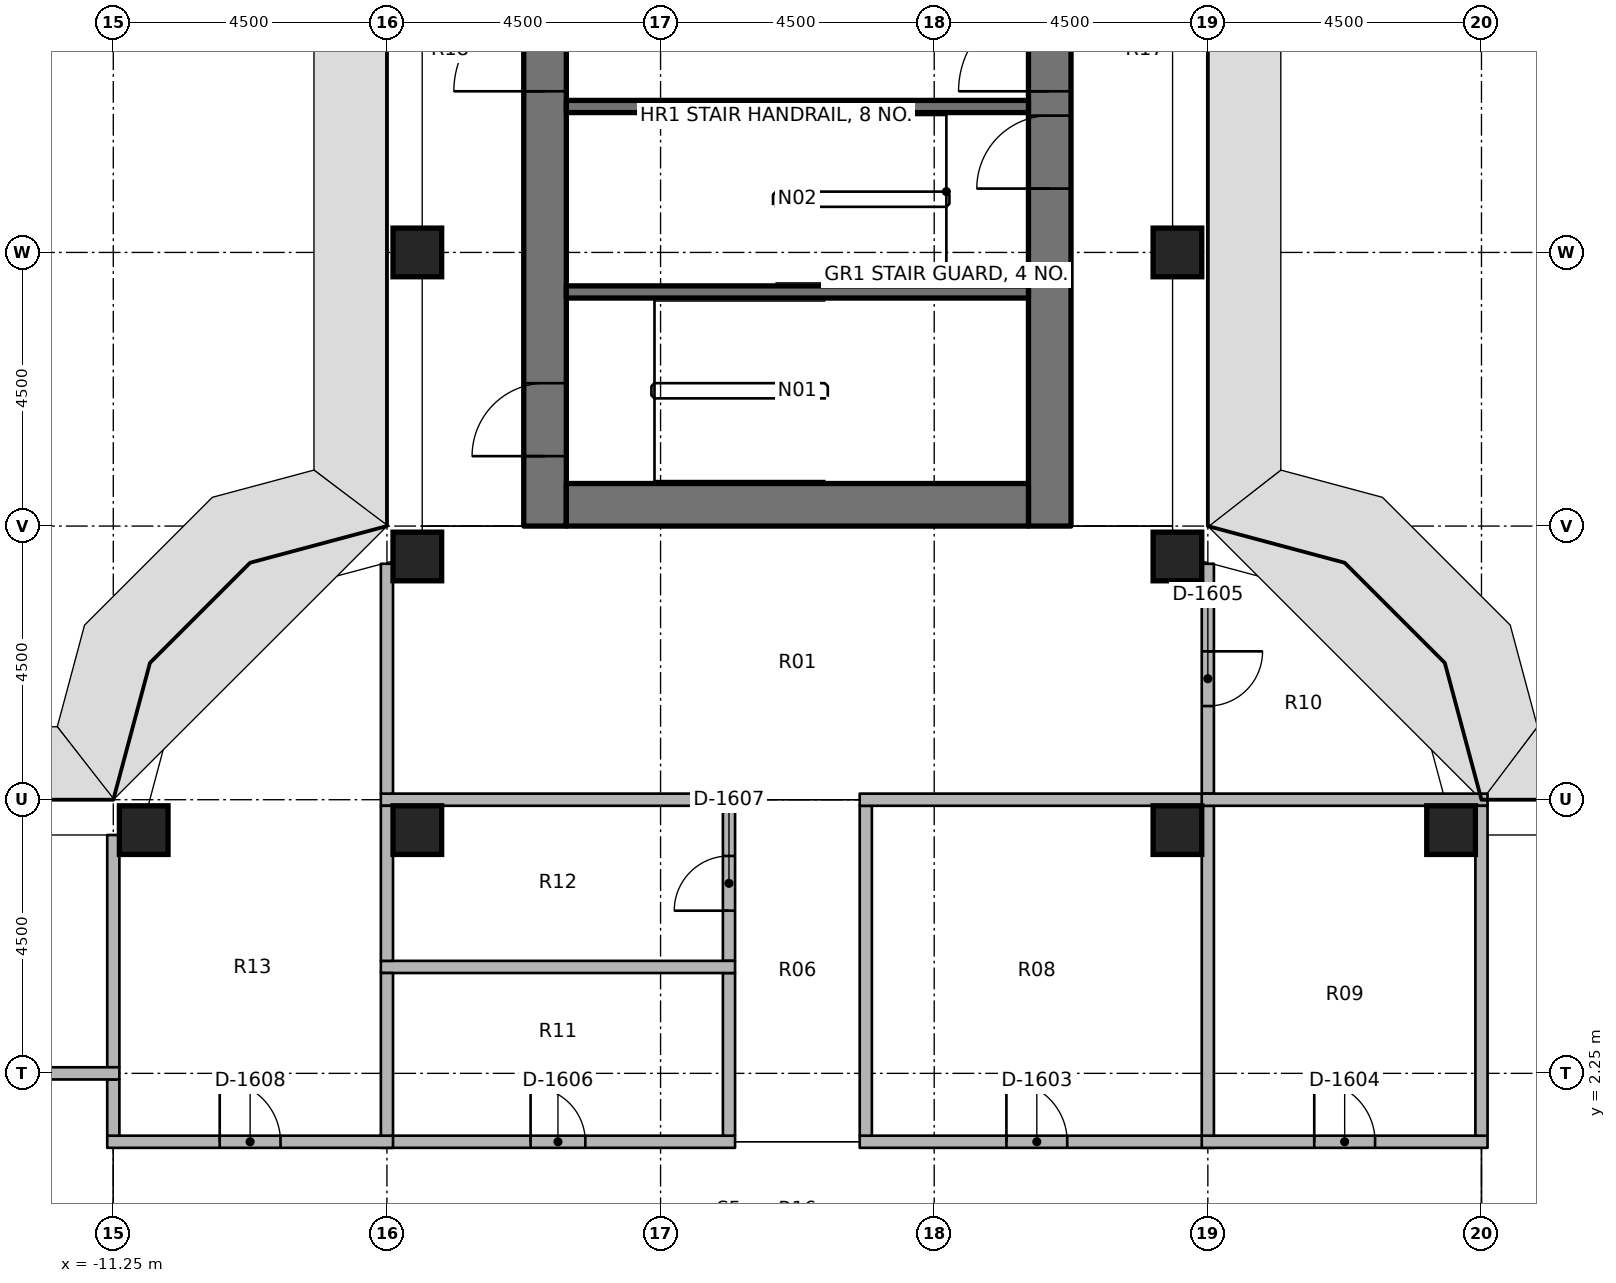
"""IFC4 building model, lengths in metres.
Left out: names, types, materials, properties, quantities, classifications, styles, units other than length and angle.
Written with IfcOpenShell. Run it as: python <this file> out.ifc"""

import sys

from ifc_helpers import new_model, si_unit, direction, frame, frame_2d, origin, origin_2d, place, context, subcontext, project, spatial, rectangle, extrude, element, fill, save


model = new_model("IFC4")
c1 = context("Model", 3, precision=1e-05, world=origin(), true_north=direction((0.0, 1.0)))
c2 = subcontext(c1, "Body", "Model", "MODEL_VIEW")
j1 = project(units=[si_unit("LENGTHUNIT", "METRE"), si_unit("PLANEANGLEUNIT", "RADIAN")], contexts=[c1])
p1 = place(None, origin())
s1 = spatial("IfcSite", under=j1, at=p1, CompositionType="ELEMENT")
p2 = place(p1, origin())
s2 = spatial("IfcBuilding", under=s1, at=p2, CompositionType="ELEMENT")
p3 = place(p2, frame((0.0, 0.0, 156.2)))
s3 = spatial("IfcBuildingStorey", under=s2, at=p3, CompositionType="ELEMENT", Elevation=156.2)
for number, where, z_axis, x_axis in (
    (1, (-10.75, 6.25, 0.0), (0.0, 0.0, 1.0), (1.0, 0.0, 0.0)),
    (2, (-6.25, 6.25, 0.0), (0.0, 0.0, 1.0), (1.0, 0.0, 0.0)),
    (3, (-6.25, 10.75, 0.0), (0.0, 0.0, 1.0), (1.0, 0.0, 0.0)),
    (4, (-6.25, 15.75, 0.0), (0.0, 0.0, 1.0), (1.0, 0.0, 0.0)),
    (5, (6.25, 6.25, 0.0), (0.0, 0.0, 1.0), (1.0, 0.0, 0.0)),
    (6, (6.25, 10.75, 0.0), (0.0, 0.0, 1.0), (1.0, 0.0, 0.0)),
    (7, (6.25, 15.75, 0.0), (0.0, 0.0, 1.0), (1.0, 0.0, 0.0)),
    (8, (10.75, 6.25, 0.0), (0.0, 0.0, 1.0), (1.0, 0.0, 0.0)),
):
    element("IfcColumn", number, at=place(p3, frame(where, z_axis=z_axis, x_axis=x_axis)), inside=s3, PredefinedType="COLUMN", context=c2, shape_type="SweptSolid", body=[
        extrude(rectangle(XDim=0.8, YDim=0.8, at=origin_2d()), origin(), (0.0, 0.0, 1.0), 3.65),
    ])
p4 = place(p3, frame((-4.15, 11.25, 0.0), z_axis=(0.0, 0.0, 1.0), x_axis=(0.0, 1.0, 0.0)))
e9 = element("IfcWall", 9, at=p4, inside=s3, PredefinedType="SHEAR", context=c2, shape_type="SweptSolid", body=[
    extrude(rectangle(XDim=15.0, YDim=0.7, at=frame_2d((7.5, 0.0))), origin(), (0.0, 0.0, 1.0), 3.8),
])
p5 = place(p4, frame((7.15, 0.0, 0.0)))
e10 = element("IfcOpeningElement", 10, at=p5, cuts=e9, PredefinedType="OPENING", context=c2, shape_type="SweptSolid", body=[
    extrude(rectangle(XDim=1.5, YDim=2.3, at=frame_2d((0.75, 1.15))), frame((0.0, 0.36, 0.0), z_axis=(0.0, -1.0, 0.0), x_axis=(1.0, 0.0, 0.0)), (0.0, 0.0, 1.0), 0.72),
])
p6 = place(p4, frame((13.9, 0.0, 0.0)))
e11 = element("IfcOpeningElement", 11, at=p6, cuts=e9, PredefinedType="OPENING", context=c2, shape_type="SweptSolid", body=[
    extrude(rectangle(XDim=0.9, YDim=2.1, at=frame_2d((0.45, 1.05))), frame((0.0, 0.36, 0.0), z_axis=(0.0, -1.0, 0.0), x_axis=(1.0, 0.0, 0.0)), (0.0, 0.0, 1.0), 0.72),
])
p7 = place(p4, frame((1.15, 0.0, 0.0)))
e12 = element("IfcOpeningElement", 12, at=p7, cuts=e9, PredefinedType="OPENING", context=c2, shape_type="SweptSolid", body=[
    extrude(rectangle(XDim=1.2, YDim=2.1, at=frame_2d((0.6, 1.05))), frame((0.0, 0.36, 0.0), z_axis=(0.0, -1.0, 0.0), x_axis=(1.0, 0.0, 0.0)), (0.0, 0.0, 1.0), 0.72),
])
p8 = place(p3, frame((4.15, 11.25, 0.0), z_axis=(0.0, 0.0, 1.0), x_axis=(0.0, 1.0, 0.0)))
e13 = element("IfcWall", 13, at=p8, inside=s3, PredefinedType="SHEAR", context=c2, shape_type="SweptSolid", body=[
    extrude(rectangle(XDim=15.0, YDim=0.7, at=frame_2d((7.5, 0.0))), origin(), (0.0, 0.0, 1.0), 3.8),
])
p9 = place(p8, frame((7.15, 0.0, 0.0)))
e14 = element("IfcOpeningElement", 14, at=p9, cuts=e13, PredefinedType="OPENING", context=c2, shape_type="SweptSolid", body=[
    extrude(rectangle(XDim=1.5, YDim=2.3, at=frame_2d((0.75, 1.15))), frame((0.0, 0.36, 0.0), z_axis=(0.0, -1.0, 0.0), x_axis=(1.0, 0.0, 0.0)), (0.0, 0.0, 1.0), 0.72),
])
p10 = place(p8, frame((5.55, 0.0, 0.0)))
e15 = element("IfcOpeningElement", 15, at=p10, cuts=e13, PredefinedType="OPENING", context=c2, shape_type="SweptSolid", body=[
    extrude(rectangle(XDim=1.2, YDim=2.1, at=frame_2d((0.6, 1.05))), frame((0.0, 0.36, 0.0), z_axis=(0.0, -1.0, 0.0), x_axis=(1.0, 0.0, 0.0)), (0.0, 0.0, 1.0), 0.72),
])
p11 = place(p3, frame((-3.8, 11.6, 0.0), z_axis=(0.0, 0.0, 1.0), x_axis=(1.0, 0.0, 0.0)))
e16 = element("IfcWall", 16, at=p11, inside=s3, PredefinedType="SHEAR", context=c2, shape_type="SweptSolid", body=[
    extrude(rectangle(XDim=7.6, YDim=0.7, at=frame_2d((3.8, 0.0))), origin(), (0.0, 0.0, 1.0), 3.8),
])
for number, where, z_axis, x_axis in (
    (17, (-3.8, 18.15, 0.0), (0.0, 0.0, 1.0), (1.0, 0.0, 0.0)),
    (18, (-3.8, 15.1, 0.0), (0.0, 0.0, 1.0), (1.0, 0.0, 0.0)),
):
    element("IfcWall", number, at=place(p3, frame(where, z_axis=z_axis, x_axis=x_axis)), inside=s3, PredefinedType="SHEAR", context=c2, shape_type="SweptSolid", body=[
        extrude(rectangle(XDim=7.6, YDim=0.2, at=frame_2d((3.8, 0.0))), origin(), (0.0, 0.0, 1.0), 3.65),
    ])
p12 = place(p3, frame((1.025, 1.125, 0.0), z_axis=(0.0, 0.0, 1.0), x_axis=(1.0, 0.0, 0.0)))
e19 = element("IfcWall", 19, at=p12, inside=s3, PredefinedType="PARTITIONING", context=c2, shape_type="SweptSolid", body=[
    extrude(rectangle(XDim=5.825, YDim=0.2, at=frame_2d((2.913, 0.0))), origin(), (0.0, 0.0, 1.0), 2.75),
])
p13 = place(p12, frame((2.413, 0.0, 0.0)))
e20 = element("IfcOpeningElement", 20, at=p13, cuts=e19, PredefinedType="OPENING", context=c2, shape_type="SweptSolid", body=[
    extrude(rectangle(XDim=1.0, YDim=2.1, at=frame_2d((0.5, 1.05))), frame((0.0, 0.11, 0.0), z_axis=(0.0, -1.0, 0.0), x_axis=(1.0, 0.0, 0.0)), (0.0, 0.0, 1.0), 0.22),
])
p14 = place(p3, frame((6.65, 1.125, 0.0), z_axis=(0.0, 0.0, 1.0), x_axis=(1.0, 0.0, 0.0)))
e21 = element("IfcWall", 21, at=p14, inside=s3, PredefinedType="PARTITIONING", context=c2, shape_type="SweptSolid", body=[
    extrude(rectangle(XDim=4.7, YDim=0.2, at=frame_2d((2.35, 0.0))), origin(), (0.0, 0.0, 1.0), 2.75),
])
p15 = place(p14, frame((1.85, 0.0, 0.0)))
e22 = element("IfcOpeningElement", 22, at=p15, cuts=e21, PredefinedType="OPENING", context=c2, shape_type="SweptSolid", body=[
    extrude(rectangle(XDim=1.0, YDim=2.1, at=frame_2d((0.5, 1.05))), frame((0.0, 0.11, 0.0), z_axis=(0.0, -1.0, 0.0), x_axis=(1.0, 0.0, 0.0)), (0.0, 0.0, 1.0), 0.22),
])
p16 = place(p3, frame((-6.85, 1.125, 0.0), z_axis=(0.0, 0.0, 1.0), x_axis=(1.0, 0.0, 0.0)))
e23 = element("IfcWall", 23, at=p16, inside=s3, PredefinedType="PARTITIONING", context=c2, shape_type="SweptSolid", body=[
    extrude(rectangle(XDim=5.825, YDim=0.2, at=frame_2d((2.913, 0.0))), origin(), (0.0, 0.0, 1.0), 2.75),
])
p17 = place(p16, frame((2.462, 0.0, 0.0)))
e24 = element("IfcOpeningElement", 24, at=p17, cuts=e23, PredefinedType="OPENING", context=c2, shape_type="SweptSolid", body=[
    extrude(rectangle(XDim=0.9, YDim=2.1, at=frame_2d((0.45, 1.05))), frame((0.0, 0.11, 0.0), z_axis=(0.0, -1.0, 0.0), x_axis=(1.0, 0.0, 0.0)), (0.0, 0.0, 1.0), 0.22),
])
p18 = place(p3, frame((-11.35, 1.125, 0.0), z_axis=(0.0, 0.0, 1.0), x_axis=(1.0, 0.0, 0.0)))
e25 = element("IfcWall", 25, at=p18, inside=s3, PredefinedType="PARTITIONING", context=c2, shape_type="SweptSolid", body=[
    extrude(rectangle(XDim=4.7, YDim=0.2, at=frame_2d((2.35, 0.0))), origin(), (0.0, 0.0, 1.0), 2.75),
])
p19 = place(p18, frame((1.85, 0.0, 0.0)))
e26 = element("IfcOpeningElement", 26, at=p19, cuts=e25, PredefinedType="OPENING", context=c2, shape_type="SweptSolid", body=[
    extrude(rectangle(XDim=1.0, YDim=2.1, at=frame_2d((0.5, 1.05))), frame((0.0, 0.11, 0.0), z_axis=(0.0, -1.0, 0.0), x_axis=(1.0, 0.0, 0.0)), (0.0, 0.0, 1.0), 0.22),
])
p20 = place(p3, frame((1.125, 1.225, 0.0), z_axis=(0.0, 0.0, 1.0), x_axis=(0.0, 1.0, 0.0)))
e27 = element("IfcWall", 27, at=p20, inside=s3, PredefinedType="PARTITIONING", context=c2, shape_type="SweptSolid", body=[
    extrude(rectangle(XDim=5.425, YDim=0.2, at=frame_2d((2.712, 0.0))), origin(), (0.0, 0.0, 1.0), 2.75),
])
p21 = place(p3, frame((-1.125, 1.225, 0.0), z_axis=(0.0, 0.0, 1.0), x_axis=(0.0, 1.0, 0.0)))
e28 = element("IfcWall", 28, at=p21, inside=s3, PredefinedType="PARTITIONING", context=c2, shape_type="SweptSolid", body=[
    extrude(rectangle(XDim=2.675, YDim=0.2, at=frame_2d((1.337, 0.0))), origin(), (0.0, 0.0, 1.0), 2.75),
])
p22 = place(p3, frame((-1.125, 4.1, 0.0), z_axis=(0.0, 0.0, 1.0), x_axis=(0.0, 1.0, 0.0)))
e29 = element("IfcWall", 29, at=p22, inside=s3, PredefinedType="PARTITIONING", context=c2, shape_type="SweptSolid", body=[
    extrude(rectangle(XDim=2.55, YDim=0.2, at=frame_2d((1.275, 0.0))), origin(), (0.0, 0.0, 1.0), 2.75),
])
p23 = place(p22, frame((0.825, 0.0, 0.0)))
e30 = element("IfcOpeningElement", 30, at=p23, cuts=e29, PredefinedType="OPENING", context=c2, shape_type="SweptSolid", body=[
    extrude(rectangle(XDim=0.9, YDim=2.1, at=frame_2d((0.45, 1.05))), frame((0.0, 0.11, 0.0), z_axis=(0.0, -1.0, 0.0), x_axis=(1.0, 0.0, 0.0)), (0.0, 0.0, 1.0), 0.22),
])
p24 = place(p3, frame((1.025, 6.75, 0.0), z_axis=(0.0, 0.0, 1.0), x_axis=(1.0, 0.0, 0.0)))
e31 = element("IfcWall", 31, at=p24, inside=s3, PredefinedType="PARTITIONING", context=c2, shape_type="SweptSolid", body=[
    extrude(rectangle(XDim=5.825, YDim=0.2, at=frame_2d((2.913, 0.0))), origin(), (0.0, 0.0, 1.0), 2.75),
])
p25 = place(p3, frame((6.75, 10.63, 0.0), z_axis=(0.0, 0.0, 1.0), x_axis=(0.0, -1.0, 0.0)))
e32 = element("IfcWall", 32, at=p25, inside=s3, PredefinedType="PARTITIONING", context=c2, shape_type="SweptSolid", body=[
    extrude(rectangle(XDim=3.78, YDim=0.2, at=frame_2d((1.89, 0.0))), origin(), (0.0, 0.0, 1.0), 2.75),
])
p26 = place(p25, frame((1.44, 0.0, 0.0)))
e33 = element("IfcOpeningElement", 33, at=p26, cuts=e32, PredefinedType="OPENING", context=c2, shape_type="SweptSolid", body=[
    extrude(rectangle(XDim=0.9, YDim=2.1, at=frame_2d((0.45, 1.05))), frame((0.0, 0.11, 0.0), z_axis=(0.0, -1.0, 0.0), x_axis=(1.0, 0.0, 0.0)), (0.0, 0.0, 1.0), 0.22),
])
p27 = place(p3, frame((-6.85, 6.75, 0.0), z_axis=(0.0, 0.0, 1.0), x_axis=(1.0, 0.0, 0.0)))
e34 = element("IfcWall", 34, at=p27, inside=s3, PredefinedType="PARTITIONING", context=c2, shape_type="SweptSolid", body=[
    extrude(rectangle(XDim=5.825, YDim=0.2, at=frame_2d((2.913, 0.0))), origin(), (0.0, 0.0, 1.0), 2.75),
])
p28 = place(p3, frame((-6.75, 6.85, 0.0), z_axis=(0.0, 0.0, 1.0), x_axis=(0.0, 1.0, 0.0)))
e35 = element("IfcWall", 35, at=p28, inside=s3, PredefinedType="PARTITIONING", context=c2, shape_type="SweptSolid", body=[
    extrude(rectangle(XDim=3.78, YDim=0.2, at=frame_2d((1.89, 0.0))), origin(), (0.0, 0.0, 1.0), 2.75),
])
p29 = place(p3, frame((6.75, 1.225, 0.0), z_axis=(0.0, 0.0, 1.0), x_axis=(0.0, 1.0, 0.0)))
e36 = element("IfcWall", 36, at=p29, inside=s3, PredefinedType="PARTITIONING", context=c2, shape_type="SweptSolid", body=[
    extrude(rectangle(XDim=5.425, YDim=0.2, at=frame_2d((2.712, 0.0))), origin(), (0.0, 0.0, 1.0), 2.75),
])
p30 = place(p3, frame((6.65, 6.75, 0.0), z_axis=(0.0, 0.0, 1.0), x_axis=(1.0, 0.0, 0.0)))
e37 = element("IfcWall", 37, at=p30, inside=s3, PredefinedType="PARTITIONING", context=c2, shape_type="SweptSolid", body=[
    extrude(rectangle(XDim=4.7, YDim=0.2, at=frame_2d((2.35, 0.0))), origin(), (0.0, 0.0, 1.0), 2.75),
])
p31 = place(p3, frame((11.25, 1.225, 0.0), z_axis=(0.0, 0.0, 1.0), x_axis=(0.0, 1.0, 0.0)))
e38 = element("IfcWall", 38, at=p31, inside=s3, PredefinedType="PARTITIONING", context=c2, shape_type="SweptSolid", body=[
    extrude(rectangle(XDim=5.425, YDim=0.2, at=frame_2d((2.712, 0.0))), origin(), (0.0, 0.0, 1.0), 2.75),
])
p32 = place(p3, frame((-6.85, 4.0, 0.0), z_axis=(0.0, 0.0, 1.0), x_axis=(1.0, 0.0, 0.0)))
e39 = element("IfcWall", 39, at=p32, inside=s3, PredefinedType="PARTITIONING", context=c2, shape_type="SweptSolid", body=[
    extrude(rectangle(XDim=5.825, YDim=0.2, at=frame_2d((2.913, 0.0))), origin(), (0.0, 0.0, 1.0), 2.75),
])
p33 = place(p3, frame((-6.75, 1.225, 0.0), z_axis=(0.0, 0.0, 1.0), x_axis=(0.0, 1.0, 0.0)))
e40 = element("IfcWall", 40, at=p33, inside=s3, PredefinedType="PARTITIONING", context=c2, shape_type="SweptSolid", body=[
    extrude(rectangle(XDim=2.675, YDim=0.2, at=frame_2d((1.337, 0.0))), origin(), (0.0, 0.0, 1.0), 2.75),
])
p34 = place(p3, frame((-6.75, 4.1, 0.0), z_axis=(0.0, 0.0, 1.0), x_axis=(0.0, 1.0, 0.0)))
e41 = element("IfcWall", 41, at=p34, inside=s3, PredefinedType="PARTITIONING", context=c2, shape_type="SweptSolid", body=[
    extrude(rectangle(XDim=2.55, YDim=0.2, at=frame_2d((1.275, 0.0))), origin(), (0.0, 0.0, 1.0), 2.75),
])
p35 = place(p3, frame((-11.25, 1.225, 0.0), z_axis=(0.0, 0.0, 1.0), x_axis=(0.0, 1.0, 0.0)))
e42 = element("IfcWall", 42, at=p35, inside=s3, PredefinedType="PARTITIONING", context=c2, shape_type="SweptSolid", body=[
    extrude(rectangle(XDim=0.925, YDim=0.2, at=frame_2d((0.462, 0.0))), origin(), (0.0, 0.0, 1.0), 2.75),
])
p36 = place(p3, frame((-11.25, 2.35, 0.0), z_axis=(0.0, 0.0, 1.0), x_axis=(0.0, 1.0, 0.0)))
e43 = element("IfcWall", 43, at=p36, inside=s3, PredefinedType="PARTITIONING", context=c2, shape_type="SweptSolid", body=[
    extrude(rectangle(XDim=3.82, YDim=0.2, at=frame_2d((1.91, 0.0))), origin(), (0.0, 0.0, 1.0), 2.75),
])
p37 = place(p3, frame((-15.85, 2.25, 0.0), z_axis=(0.0, 0.0, 1.0), x_axis=(1.0, 0.0, 0.0)))
e44 = element("IfcWall", 44, at=p37, inside=s3, PredefinedType="PARTITIONING", context=c2, shape_type="SweptSolid", body=[
    extrude(rectangle(XDim=4.7, YDim=0.2, at=frame_2d((2.35, 0.0))), origin(), (0.0, 0.0, 1.0), 2.75),
])
p38 = place(p37, frame((1.85, 0.0, 0.0)))
e45 = element("IfcOpeningElement", 45, at=p38, cuts=e44, PredefinedType="OPENING", context=c2, shape_type="SweptSolid", body=[
    extrude(rectangle(XDim=1.0, YDim=2.1, at=frame_2d((0.5, 1.05))), frame((0.0, 0.11, 0.0), z_axis=(0.0, -1.0, 0.0), x_axis=(1.0, 0.0, 0.0)), (0.0, 0.0, 1.0), 0.22),
])
p39 = place(p5, origin())
e46 = element("IfcDoor", 46, at=p39, inside=s3, OperationType="DOUBLE_DOOR_SINGLE_SWING", PredefinedType="DOOR", context=c2, shape_type="SweptSolid", body=[
    extrude(rectangle(XDim=1.5, YDim=2.3, at=frame_2d((0.75, 1.15))), frame((0.0, 0.025, 0.0), z_axis=(0.0, -1.0, 0.0), x_axis=(1.0, 0.0, 0.0)), (0.0, 0.0, 1.0), 0.05),
])
fill(e10, e46)
p40 = place(p9, origin())
e47 = element("IfcDoor", 47, at=p40, inside=s3, OperationType="DOUBLE_DOOR_SINGLE_SWING", PredefinedType="DOOR", context=c2, shape_type="SweptSolid", body=[
    extrude(rectangle(XDim=1.5, YDim=2.3, at=frame_2d((0.75, 1.15))), frame((0.0, 0.025, 0.0), z_axis=(0.0, -1.0, 0.0), x_axis=(1.0, 0.0, 0.0)), (0.0, 0.0, 1.0), 0.05),
])
fill(e14, e47)
p41 = place(p10, origin())
e48 = element("IfcDoor", 48, at=p41, inside=s3, OperationType="SINGLE_SWING_LEFT", PredefinedType="DOOR", context=c2, shape_type="SweptSolid", body=[
    extrude(rectangle(XDim=1.2, YDim=2.1, at=frame_2d((0.6, 1.05))), frame((0.0, 0.025, 0.0), z_axis=(0.0, -1.0, 0.0), x_axis=(1.0, 0.0, 0.0)), (0.0, 0.0, 1.0), 0.05),
])
fill(e15, e48)
p42 = place(p7, origin())
e49 = element("IfcDoor", 49, at=p42, inside=s3, OperationType="SINGLE_SWING_RIGHT", PredefinedType="DOOR", context=c2, shape_type="SweptSolid", body=[
    extrude(rectangle(XDim=1.2, YDim=2.1, at=frame_2d((0.6, 1.05))), frame((0.0, 0.025, 0.0), z_axis=(0.0, -1.0, 0.0), x_axis=(1.0, 0.0, 0.0)), (0.0, 0.0, 1.0), 0.05),
])
fill(e12, e49)
p43 = place(p13, origin())
e50 = element("IfcDoor", 50, at=p43, inside=s3, OperationType="SINGLE_SWING_RIGHT", PredefinedType="DOOR", context=c2, shape_type="SweptSolid", body=[
    extrude(rectangle(XDim=1.0, YDim=2.1, at=frame_2d((0.5, 1.05))), frame((0.0, 0.025, 0.0), z_axis=(0.0, -1.0, 0.0), x_axis=(1.0, 0.0, 0.0)), (0.0, 0.0, 1.0), 0.05),
])
fill(e20, e50)
p44 = place(p15, origin())
e51 = element("IfcDoor", 51, at=p44, inside=s3, OperationType="SINGLE_SWING_RIGHT", PredefinedType="DOOR", context=c2, shape_type="SweptSolid", body=[
    extrude(rectangle(XDim=1.0, YDim=2.1, at=frame_2d((0.5, 1.05))), frame((0.0, 0.025, 0.0), z_axis=(0.0, -1.0, 0.0), x_axis=(1.0, 0.0, 0.0)), (0.0, 0.0, 1.0), 0.05),
])
fill(e22, e51)
p45 = place(p26, origin())
e52 = element("IfcDoor", 52, at=p45, inside=s3, OperationType="SINGLE_SWING_RIGHT", PredefinedType="DOOR", context=c2, shape_type="SweptSolid", body=[
    extrude(rectangle(XDim=0.9, YDim=2.1, at=frame_2d((0.45, 1.05))), frame((0.0, 0.025, 0.0), z_axis=(0.0, -1.0, 0.0), x_axis=(1.0, 0.0, 0.0)), (0.0, 0.0, 1.0), 0.05),
])
fill(e33, e52)
p46 = place(p17, origin())
e53 = element("IfcDoor", 53, at=p46, inside=s3, OperationType="SINGLE_SWING_RIGHT", PredefinedType="DOOR", context=c2, shape_type="SweptSolid", body=[
    extrude(rectangle(XDim=0.9, YDim=2.1, at=frame_2d((0.45, 1.05))), frame((0.0, 0.025, 0.0), z_axis=(0.0, -1.0, 0.0), x_axis=(1.0, 0.0, 0.0)), (0.0, 0.0, 1.0), 0.05),
])
fill(e24, e53)
p47 = place(p23, origin())
e54 = element("IfcDoor", 54, at=p47, inside=s3, OperationType="SINGLE_SWING_RIGHT", PredefinedType="DOOR", context=c2, shape_type="SweptSolid", body=[
    extrude(rectangle(XDim=0.9, YDim=2.1, at=frame_2d((0.45, 1.05))), frame((0.0, 0.025, 0.0), z_axis=(0.0, -1.0, 0.0), x_axis=(1.0, 0.0, 0.0)), (0.0, 0.0, 1.0), 0.05),
])
fill(e30, e54)
p48 = place(p19, origin())
e55 = element("IfcDoor", 55, at=p48, inside=s3, OperationType="SINGLE_SWING_RIGHT", PredefinedType="DOOR", context=c2, shape_type="SweptSolid", body=[
    extrude(rectangle(XDim=1.0, YDim=2.1, at=frame_2d((0.5, 1.05))), frame((0.0, 0.025, 0.0), z_axis=(0.0, -1.0, 0.0), x_axis=(1.0, 0.0, 0.0)), (0.0, 0.0, 1.0), 0.05),
])
fill(e26, e55)
save(model, sys.argv[1])
